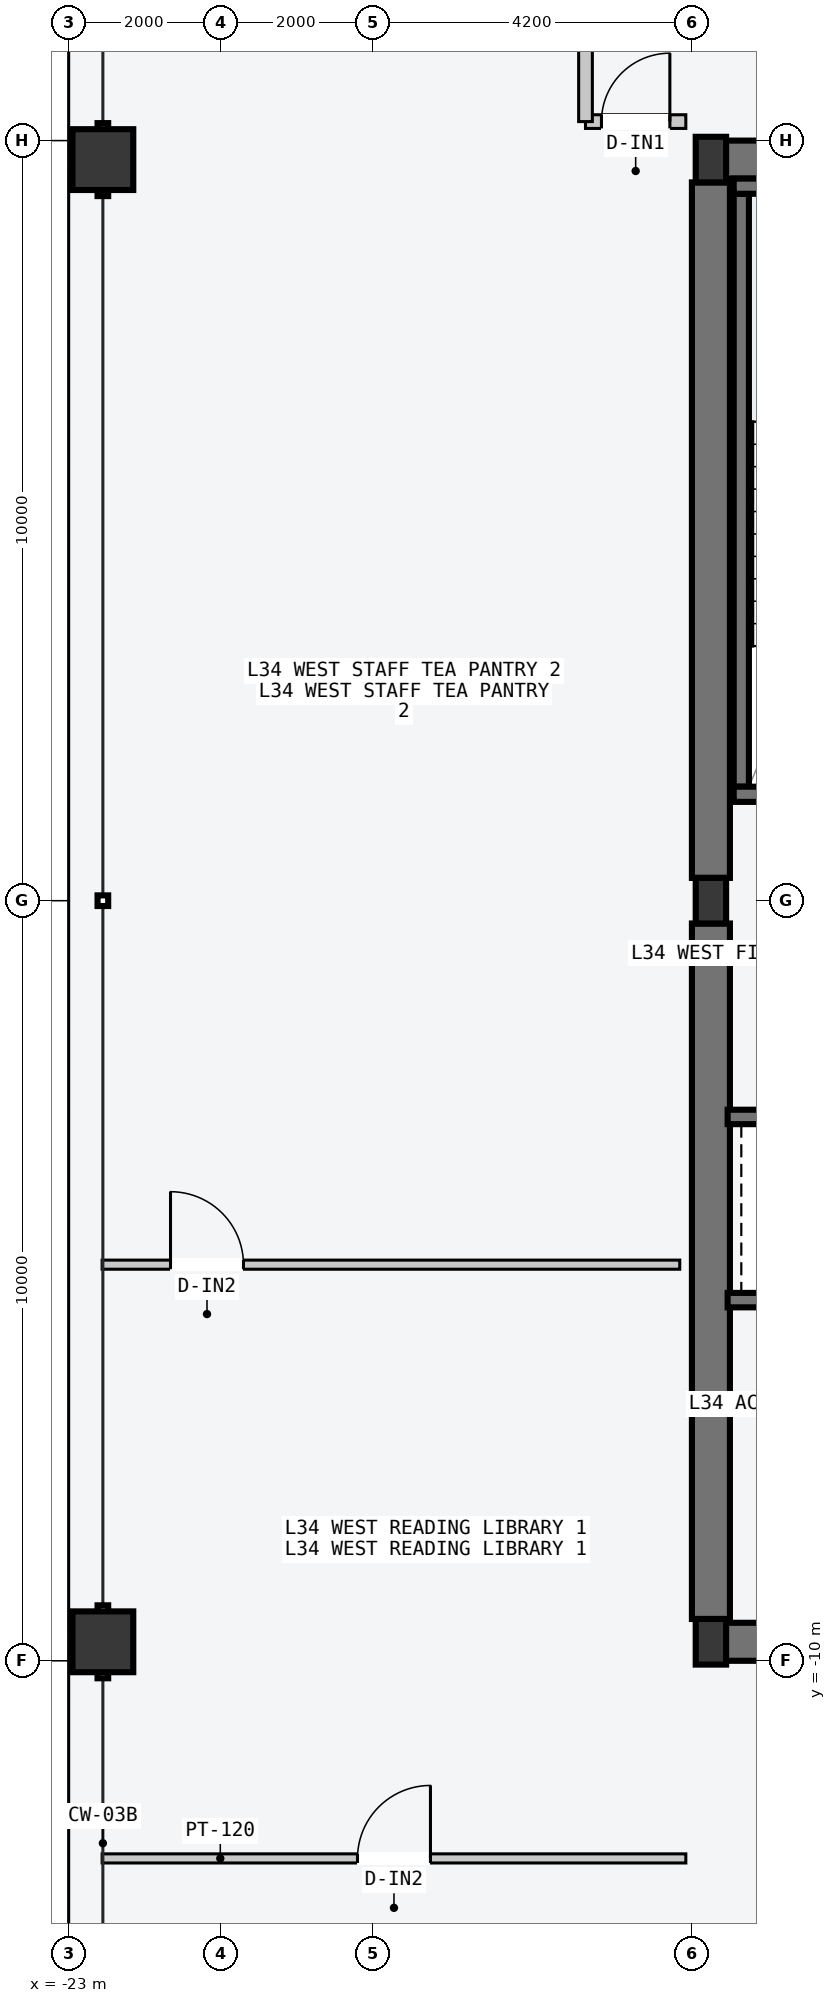
"""IFC4 building model, lengths in metres.
Left out: names, types, materials, properties, quantities, classifications, styles, units other than length and angle.
Written with IfcOpenShell. Run it as: python <this file> out.ifc"""

import sys

from ifc_helpers import new_model, si_unit, direction, frame, frame_2d, origin, origin_2d, place, context, subcontext, project, spatial, rectangle, hollow_rectangle, i_section, extrude, element, fill, save


model = new_model("IFC4")
c1 = context("Model", 3, precision=1e-05, world=origin(), true_north=direction((0.0, 1.0)))
c2 = subcontext(c1, "Body", "Model", "MODEL_VIEW")
j1 = project(units=[si_unit("LENGTHUNIT", "METRE"), si_unit("PLANEANGLEUNIT", "RADIAN")], contexts=[c1])
p1 = place(None, origin())
s1 = spatial("IfcSite", under=j1, at=p1, CompositionType="ELEMENT")
p2 = place(p1, origin())
s2 = spatial("IfcBuilding", under=s1, at=p2, CompositionType="ELEMENT")
p3 = place(p2, frame((0.0, 0.0, 131.4)))
s3 = spatial("IfcBuildingStorey", under=s2, at=p3, CompositionType="ELEMENT", Elevation=131.4)
for number, where, z_axis, x_axis in (
    (1, (-14.53, -9.75, -0.2), (0.0, 0.0, 1.0), (1.0, 0.0, 0.0)),
    (2, (-14.53, 9.75, -0.2), (0.0, 0.0, 1.0), (1.0, 0.0, 0.0)),
):
    element("IfcWall", number, at=place(p3, frame(where, z_axis=z_axis, x_axis=x_axis)), inside=s3, PredefinedType="SHEAR", context=c2, shape_type="SweptSolid", body=[
        extrude(rectangle(XDim=6.46, YDim=0.5, at=frame_2d((3.23, 0.0))), origin(), (0.0, 0.0, 1.0), 3.6),
    ])
for number, where, z_axis, x_axis in (
    (3, (-14.55, -9.45, -0.2), (0.0, 0.0, 1.0), (0.0, 1.0, 0.0)),
    (4, (-14.55, 0.3, -0.2), (0.0, 0.0, 1.0), (0.0, 1.0, 0.0)),
):
    element("IfcWall", number, at=place(p3, frame(where, z_axis=z_axis, x_axis=x_axis)), inside=s3, PredefinedType="SHEAR", context=c2, shape_type="SweptSolid", body=[
        extrude(rectangle(XDim=9.15, YDim=0.5, at=frame_2d((4.575, 0.0))), origin(), (0.0, 0.0, 1.0), 3.6),
    ])
p4 = place(p3, frame((-14.15, 1.5, -0.2), z_axis=(0.0, 0.0, 1.0), x_axis=(0.0, 1.0, 0.0)))
e5 = element("IfcWall", 5, at=p4, inside=s3, PredefinedType="SOLIDWALL", context=c2, shape_type="SweptSolid", body=[
    extrude(rectangle(XDim=7.8, YDim=0.2, at=frame_2d((3.9, 0.0))), origin(), (0.0, 0.0, 1.0), 3.6),
])
p5 = place(p3, frame((-14.25, 1.4, -0.2), z_axis=(0.0, 0.0, 1.0), x_axis=(1.0, 0.0, 0.0)))
e6 = element("IfcWall", 6, at=p5, inside=s3, PredefinedType="SOLIDWALL", context=c2, shape_type="SweptSolid", body=[
    extrude(rectangle(XDim=3.72, YDim=0.2, at=frame_2d((1.86, 0.0))), origin(), (0.0, 0.0, 1.0), 3.6),
])
p6 = place(p5, frame((1.5, 0.0, 0.2)))
e7 = element("IfcOpeningElement", 7, at=p6, cuts=e6, PredefinedType="OPENING", context=c2, shape_type="SweptSolid", body=[
    extrude(rectangle(XDim=1.12, YDim=2.18, at=frame_2d((0.56, 1.09))), frame((0.0, 0.11, 0.0), z_axis=(0.0, -1.0, 0.0), x_axis=(1.0, 0.0, 0.0)), (0.0, 0.0, 1.0), 0.22),
])
p7 = place(p3, frame((-14.25, 9.4, -0.2), z_axis=(0.0, 0.0, 1.0), x_axis=(1.0, 0.0, 0.0)))
e8 = element("IfcWall", 8, at=p7, inside=s3, PredefinedType="SOLIDWALL", context=c2, shape_type="SweptSolid", body=[
    extrude(rectangle(XDim=3.72, YDim=0.2, at=frame_2d((1.86, 0.0))), origin(), (0.0, 0.0, 1.0), 3.6),
])
for number, where, z_axis, x_axis in (
    (9, (-14.55, -9.75, 0.0), (0.0, 0.0, 1.0), (1.0, 0.0, 0.0)),
    (10, (-14.55, 0.0, 0.0), (0.0, 0.0, 1.0), (1.0, 0.0, 0.0)),
    (11, (-14.55, 9.75, 0.0), (0.0, 0.0, 1.0), (1.0, 0.0, 0.0)),
):
    element("IfcColumn", number, at=place(p3, frame(where, z_axis=z_axis, x_axis=x_axis)), inside=s3, PredefinedType="COLUMN", context=c2, shape_type="SweptSolid", body=[
        extrude(i_section(OverallWidth=0.4, OverallDepth=0.6, WebThickness=0.022, FlangeThickness=0.036, at=origin_2d()), origin(), (0.0, 0.0, 1.0), 3.6),
    ])
for number, where, z_axis, x_axis in (
    (12, (-22.55, -9.75, 0.0), (0.0, 0.0, 1.0), (0.0, 1.0, 0.0)),
    (13, (-22.55, 9.75, 0.0), (0.0, 0.0, 1.0), (0.0, 1.0, 0.0)),
):
    element("IfcColumn", number, at=place(p3, frame(where, z_axis=z_axis, x_axis=x_axis)), inside=s3, PredefinedType="COLUMN", context=c2, shape_type="SweptSolid", body=[
        extrude(hollow_rectangle(XDim=0.8, YDim=0.8, WallThickness=0.036, at=origin_2d()), origin(), (0.0, 0.0, 1.0), 3.6),
    ])
p8 = place(p3, frame((-14.33, -2.845, -0.2), z_axis=(0.0, 0.0, 1.0), x_axis=(1.0, 0.0, 0.0)))
e14 = element("IfcWall", 14, at=p8, inside=s3, PredefinedType="SOLIDWALL", context=c2, shape_type="SweptSolid", body=[
    extrude(rectangle(XDim=2.68, YDim=0.19, at=frame_2d((1.34, 0.0))), origin(), (0.0, 0.0, 1.0), 3.6),
])
p9 = place(p8, frame((0.83, 0.0, 0.2)))
e15 = element("IfcOpeningElement", 15, at=p9, cuts=e14, PredefinedType="OPENING", context=c2, shape_type="SweptSolid", body=[
    extrude(rectangle(XDim=1.2, YDim=2.2, at=frame_2d((0.6, 1.1))), frame((0.0, 0.105, 0.0), z_axis=(0.0, -1.0, 0.0), x_axis=(1.0, 0.0, 0.0)), (0.0, 0.0, 1.0), 0.21),
])
p10 = place(p3, frame((-14.33, -5.255, -0.2), z_axis=(0.0, 0.0, 1.0), x_axis=(1.0, 0.0, 0.0)))
e16 = element("IfcWall", 16, at=p10, inside=s3, PredefinedType="SOLIDWALL", context=c2, shape_type="SweptSolid", body=[
    extrude(rectangle(XDim=2.68, YDim=0.19, at=frame_2d((1.34, 0.0))), origin(), (0.0, 0.0, 1.0), 3.6),
])
p11 = place(p3, frame((-22.56, -12.6, 0.0), z_axis=(0.0, 0.0, 1.0), x_axis=(1.0, 0.0, 0.0)))
e17 = element("IfcWall", 17, at=p11, inside=s3, PredefinedType="PARTITIONING", context=c2, shape_type="SweptSolid", body=[
    extrude(rectangle(XDim=7.68, YDim=0.12, at=frame_2d((3.84, 0.0))), origin(), (0.0, 0.0, 1.0), 3.4),
])
p12 = place(p11, frame((3.36, 0.0, 0.0)))
e18 = element("IfcOpeningElement", 18, at=p12, cuts=e17, PredefinedType="OPENING", context=c2, shape_type="SweptSolid", body=[
    extrude(rectangle(XDim=0.96, YDim=2.18, at=frame_2d((0.48, 1.09))), frame((0.0, 0.07, 0.0), z_axis=(0.0, -1.0, 0.0), x_axis=(1.0, 0.0, 0.0)), (0.0, 0.0, 1.0), 0.14),
])
p13 = place(p3, frame((-16.2, 10.25, 0.0), z_axis=(0.0, 0.0, 1.0), x_axis=(1.0, 0.0, 0.0)))
e19 = element("IfcWall", 19, at=p13, inside=s3, PredefinedType="PARTITIONING", context=c2, shape_type="SweptSolid", body=[
    extrude(rectangle(XDim=1.32, YDim=0.18, at=frame_2d((0.66, 0.0))), origin(), (0.0, 0.0, 1.0), 3.4),
])
p14 = place(p13, frame((0.21, 0.0, 0.0)))
e20 = element("IfcOpeningElement", 20, at=p14, cuts=e19, PredefinedType="OPENING", context=c2, shape_type="SweptSolid", body=[
    extrude(rectangle(XDim=0.9, YDim=2.15, at=frame_2d((0.45, 1.075))), frame((0.0, 0.1, 0.0), z_axis=(0.0, -1.0, 0.0), x_axis=(1.0, 0.0, 0.0)), (0.0, 0.0, 1.0), 0.2),
])
p15 = place(p3, frame((-16.2, 10.25, 0.0), z_axis=(0.0, 0.0, 1.0), x_axis=(0.0, 1.0, 0.0)))
e21 = element("IfcWall", 21, at=p15, inside=s3, PredefinedType="PARTITIONING", context=c2, shape_type="SweptSolid", body=[
    extrude(rectangle(XDim=1.95, YDim=0.18, at=frame_2d((0.975, 0.0))), origin(), (0.0, 0.0, 1.0), 3.4),
])
p16 = place(p3, frame((-22.56, -4.788, 0.0), z_axis=(0.0, 0.0, 1.0), x_axis=(1.0, 0.0, 0.0)))
e22 = element("IfcWall", 22, at=p16, inside=s3, PredefinedType="PARTITIONING", context=c2, shape_type="SweptSolid", body=[
    extrude(rectangle(XDim=7.6, YDim=0.12, at=frame_2d((3.8, 0.0))), origin(), (0.0, 0.0, 1.0), 3.4),
])
p17 = place(p16, frame((0.9, 0.0, 0.0)))
e23 = element("IfcOpeningElement", 23, at=p17, cuts=e22, PredefinedType="OPENING", context=c2, shape_type="SweptSolid", body=[
    extrude(rectangle(XDim=0.96, YDim=2.18, at=frame_2d((0.48, 1.09))), frame((0.0, 0.07, 0.0), z_axis=(0.0, -1.0, 0.0), x_axis=(1.0, 0.0, 0.0)), (0.0, 0.0, 1.0), 0.14),
])
p18 = place(p12, origin())
e24 = element("IfcDoor", 24, at=p18, inside=s3, OperationType="SINGLE_SWING_RIGHT", PredefinedType="DOOR", context=c2, shape_type="SweptSolid", body=[
    extrude(rectangle(XDim=0.96, YDim=2.18, at=frame_2d((0.48, 1.09))), frame((0.0, 0.025, 0.0), z_axis=(0.0, -1.0, 0.0), x_axis=(1.0, 0.0, 0.0)), (0.0, 0.0, 1.0), 0.05),
])
fill(e18, e24)
p19 = place(p14, origin())
e25 = element("IfcDoor", 25, at=p19, inside=s3, OperationType="SINGLE_SWING_RIGHT", PredefinedType="DOOR", context=c2, shape_type="SweptSolid", body=[
    extrude(rectangle(XDim=0.9, YDim=2.15, at=frame_2d((0.45, 1.075))), frame((0.0, 0.025, 0.0), z_axis=(0.0, -1.0, 0.0), x_axis=(1.0, 0.0, 0.0)), (0.0, 0.0, 1.0), 0.05),
])
fill(e20, e25)
p20 = place(p17, origin())
e26 = element("IfcDoor", 26, at=p20, inside=s3, OperationType="SINGLE_SWING_LEFT", PredefinedType="DOOR", context=c2, shape_type="SweptSolid", body=[
    extrude(rectangle(XDim=0.96, YDim=2.18, at=frame_2d((0.48, 1.09))), frame((0.0, 0.025, 0.0), z_axis=(0.0, -1.0, 0.0), x_axis=(1.0, 0.0, 0.0)), (0.0, 0.0, 1.0), 0.05),
])
fill(e23, e26)
save(model, sys.argv[1])
